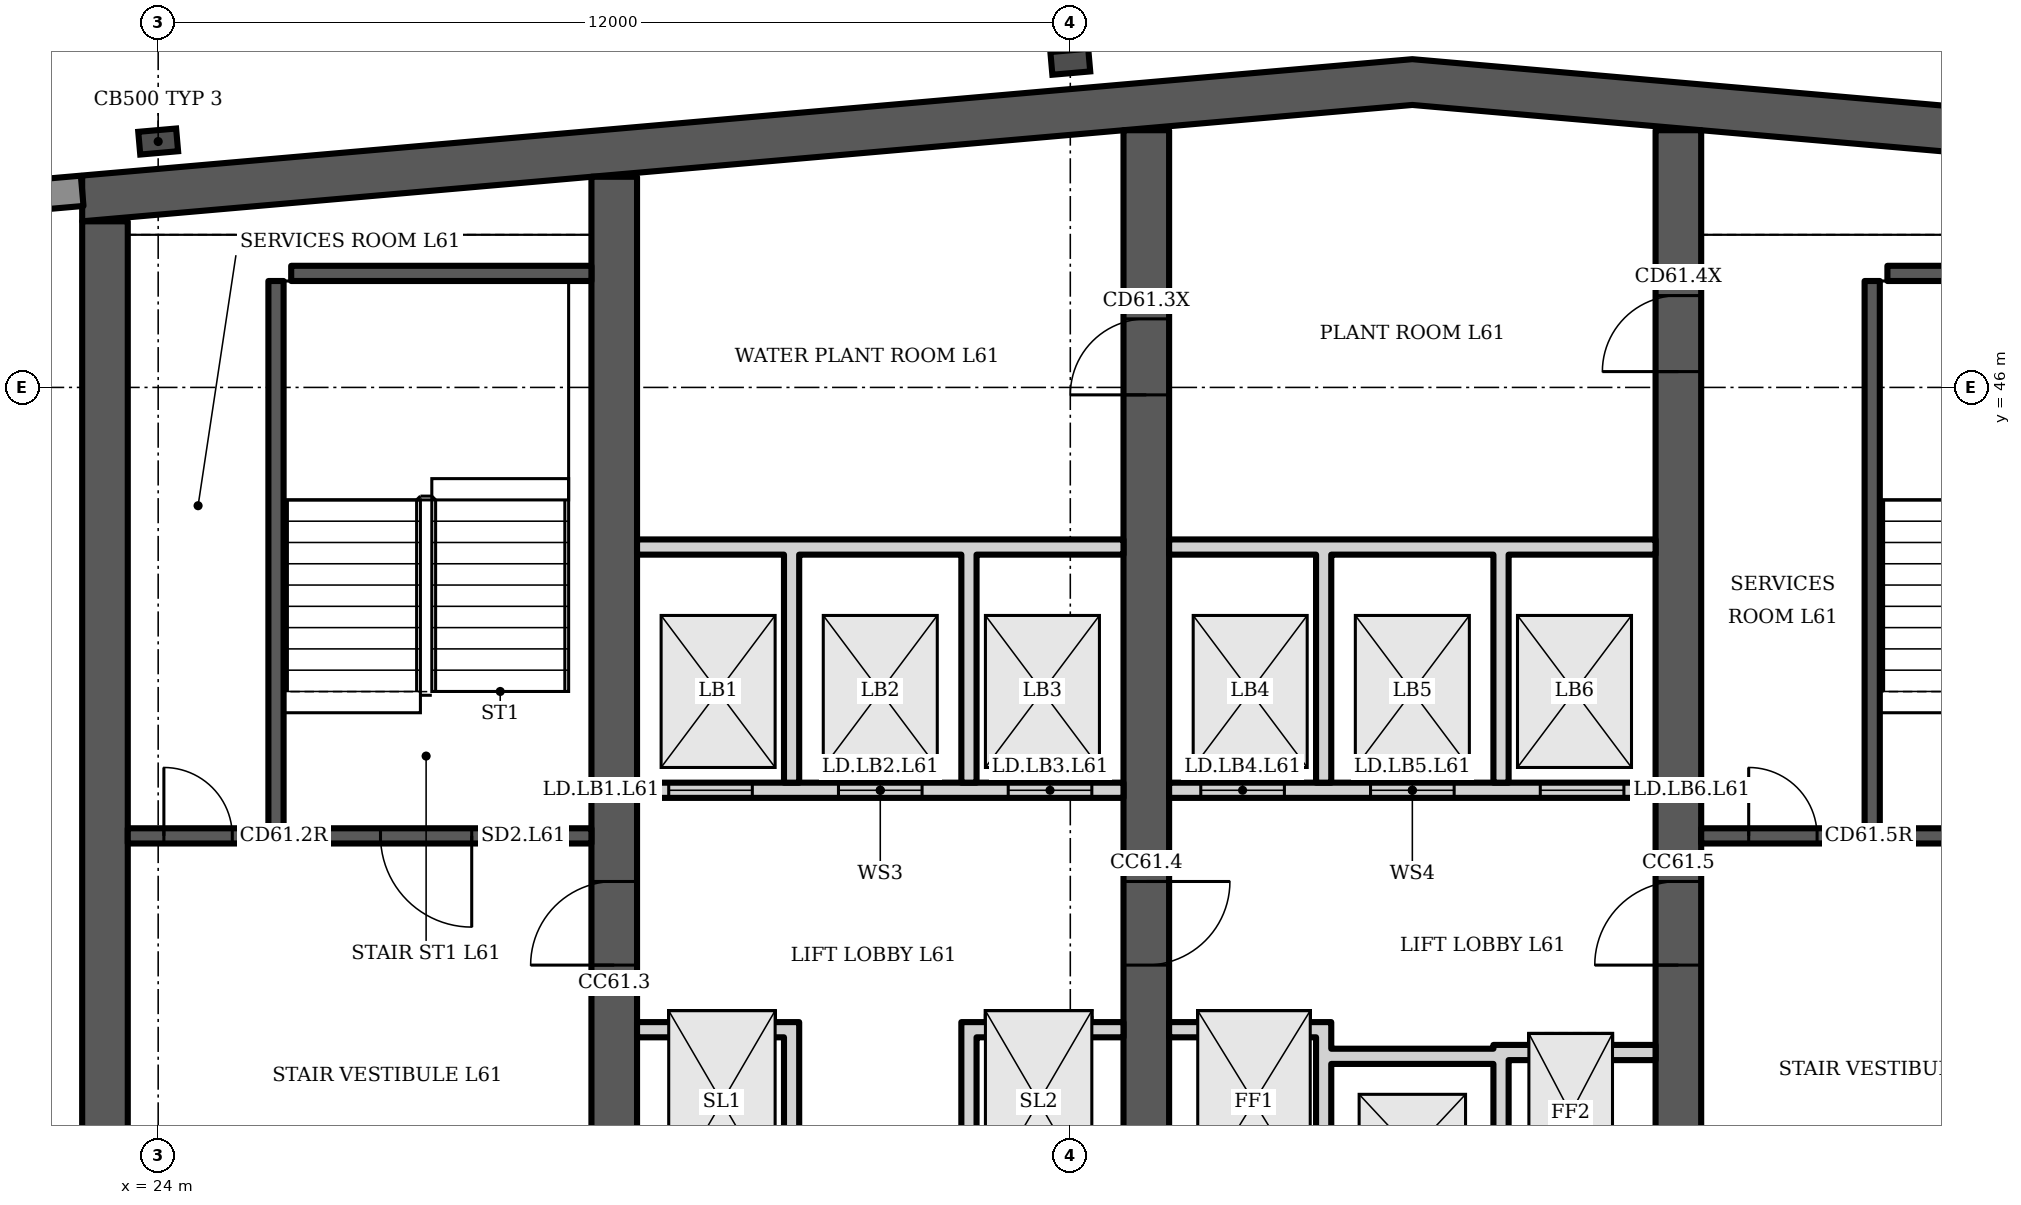
"""IFC4 building model, lengths in metres.
Left out: names, types, materials, properties, quantities, classifications, styles, units other than length and angle.
Written with IfcOpenShell. Run it as: python <this file> out.ifc"""

import sys

from ifc_helpers import new_model, si_unit, direction, frame, frame_2d, origin, origin_2d, place, context, subcontext, project, spatial, polyline, rectangle, i_section, outline, extrude, element, fill, save


model = new_model("IFC4")
c1 = context("Model", 3, precision=1e-05, world=origin(), true_north=direction((0.0, 1.0)))
c2 = subcontext(c1, "Body", "Model", "MODEL_VIEW")
j1 = project(units=[si_unit("LENGTHUNIT", "METRE"), si_unit("PLANEANGLEUNIT", "RADIAN")], contexts=[c1])
p1 = place(None, origin())
s1 = spatial("IfcSite", under=j1, at=p1, CompositionType="ELEMENT")
p2 = place(p1, origin())
s2 = spatial("IfcBuilding", under=s1, at=p2, CompositionType="ELEMENT")
p3 = place(p2, frame((0.0, 0.0, 243.1)))
s3 = spatial("IfcBuildingStorey", under=s2, at=p3, CompositionType="ELEMENT", Elevation=243.1)
p4 = place(p3, frame((0.0, 0.0, -0.0)))
e1 = element("IfcWall", 1, at=p4, inside=s3, PredefinedType="SHEAR", context=c2, shape_type="SweptSolid", body=[
    extrude(outline(polyline([(23.0, 48.185), (40.5, 49.716), (58.0, 48.185), (58.0, 48.787), (40.5, 50.318), (23.0, 48.787), (23.0, 48.185)])), origin(), (0.0, 0.0, 1.0), 3.6),
])
p5 = place(p3, frame((23.3, 34.6, 0.0), z_axis=(0.0, 0.0, 1.0), x_axis=(0.0, 1.0, 0.0)))
e2 = element("IfcWall", 2, at=p5, inside=s3, PredefinedType="SHEAR", context=c2, shape_type="SweptSolid", body=[
    extrude(rectangle(XDim=13.585, YDim=0.6, at=frame_2d((6.792, 0.0))), origin(), (0.0, 0.0, 1.0), 3.6),
])
p6 = place(p3, frame((30.0, 34.6, 0.0), z_axis=(0.0, 0.0, 1.0), x_axis=(0.0, 1.0, 0.0)))
e3 = element("IfcWall", 3, at=p6, inside=s3, PredefinedType="SHEAR", context=c2, shape_type="SweptSolid", body=[
    extrude(rectangle(XDim=14.171, YDim=0.6, at=frame_2d((7.085, 0.0))), origin(), (0.0, 0.0, 1.0), 3.6),
])
p7 = place(p6, frame((3.8, 0.0, 0.0)))
e4 = element("IfcOpeningElement", 4, at=p7, cuts=e3, PredefinedType="OPENING", context=c2, shape_type="SweptSolid", body=[
    extrude(rectangle(XDim=1.1, YDim=2.1, at=frame_2d((0.55, 1.05))), frame((0.0, 0.31, 0.0), z_axis=(0.0, -1.0, 0.0), x_axis=(1.0, 0.0, 0.0)), (0.0, 0.0, 1.0), 0.62),
])
p8 = place(p3, frame((37.0, 34.6, 0.0), z_axis=(0.0, 0.0, 1.0), x_axis=(0.0, 1.0, 0.0)))
e5 = element("IfcWall", 5, at=p8, inside=s3, PredefinedType="SHEAR", context=c2, shape_type="SweptSolid", body=[
    extrude(rectangle(XDim=14.784, YDim=0.6, at=frame_2d((7.392, 0.0))), origin(), (0.0, 0.0, 1.0), 3.6),
])
p9 = place(p8, frame((11.302, 0.0, 0.0)))
e6 = element("IfcOpeningElement", 6, at=p9, cuts=e5, PredefinedType="OPENING", context=c2, shape_type="SweptSolid", body=[
    extrude(rectangle(XDim=1.0, YDim=2.1, at=frame_2d((0.5, 1.05))), frame((0.0, 0.31, 0.0), z_axis=(0.0, -1.0, 0.0), x_axis=(1.0, 0.0, 0.0)), (0.0, 0.0, 1.0), 0.62),
])
p10 = place(p8, frame((3.8, 0.0, 0.0)))
e7 = element("IfcOpeningElement", 7, at=p10, cuts=e5, PredefinedType="OPENING", context=c2, shape_type="SweptSolid", body=[
    extrude(rectangle(XDim=1.1, YDim=2.1, at=frame_2d((0.55, 1.05))), frame((0.0, 0.31, 0.0), z_axis=(0.0, -1.0, 0.0), x_axis=(1.0, 0.0, 0.0)), (0.0, 0.0, 1.0), 0.62),
])
p11 = place(p3, frame((44.0, 34.6, 0.0), z_axis=(0.0, 0.0, 1.0), x_axis=(0.0, 1.0, 0.0)))
e8 = element("IfcWall", 8, at=p11, inside=s3, PredefinedType="SHEAR", context=c2, shape_type="SweptSolid", body=[
    extrude(rectangle(XDim=14.784, YDim=0.6, at=frame_2d((7.392, 0.0))), origin(), (0.0, 0.0, 1.0), 3.6),
])
p12 = place(p11, frame((11.608, 0.0, 0.0)))
e9 = element("IfcOpeningElement", 9, at=p12, cuts=e8, PredefinedType="OPENING", context=c2, shape_type="SweptSolid", body=[
    extrude(rectangle(XDim=1.0, YDim=2.1, at=frame_2d((0.5, 1.05))), frame((0.0, 0.31, 0.0), z_axis=(0.0, -1.0, 0.0), x_axis=(1.0, 0.0, 0.0)), (0.0, 0.0, 1.0), 0.62),
])
p13 = place(p11, frame((3.8, 0.0, 0.0)))
e10 = element("IfcOpeningElement", 10, at=p13, cuts=e8, PredefinedType="OPENING", context=c2, shape_type="SweptSolid", body=[
    extrude(rectangle(XDim=1.1, YDim=2.1, at=frame_2d((0.55, 1.05))), frame((0.0, 0.31, 0.0), z_axis=(0.0, -1.0, 0.0), x_axis=(1.0, 0.0, 0.0)), (0.0, 0.0, 1.0), 0.62),
])
for number, where, z_axis, x_axis in (
    (11, (24.0, 49.235, 0.0), (0.0, 0.0, 1.0), (-0.087, 0.996, 0.0)),
    (12, (36.0, 50.285, 0.0), (0.0, 0.0, 1.0), (-0.087, 0.996, 0.0)),
):
    element("IfcColumn", number, at=place(p3, frame(where, z_axis=z_axis, x_axis=x_axis)), inside=s3, PredefinedType="COLUMN", context=c2, shape_type="SweptSolid", body=[
        extrude(i_section(OverallWidth=0.3, OverallDepth=0.5, WebThickness=0.014, FlangeThickness=0.028, FilletRadius=0.027, at=origin_2d()), origin(), (0.0, 0.0, 1.0), 3.6),
    ])
p14 = place(p3, frame((23.0, 48.587, 0.0), z_axis=(0.0, 0.0, 1.0), x_axis=(-0.996194, -0.087168, 0.0)))
e13 = element("IfcWall", 13, at=p14, inside=s3, PredefinedType="SOLIDWALL", context=c2, shape_type="SweptSolid", body=[
    extrude(rectangle(XDim=2.994, YDim=0.4, at=frame_2d((1.497, 0.0))), origin(), (0.0, 0.0, 1.0), 3.2),
])
p15 = place(p3, frame((23.6, 40.1, 0.0), z_axis=(0.0, 0.0, 1.0), x_axis=(1.0, 0.0, 0.0)))
e14 = element("IfcWall", 14, at=p15, inside=s3, PredefinedType="SHEAR", context=c2, shape_type="SweptSolid", body=[
    extrude(rectangle(XDim=6.1, YDim=0.2, at=frame_2d((3.05, 0.0))), origin(), (0.0, 0.0, 1.0), 3.2),
])
p16 = place(p15, frame((3.325, 0.0, 0.0)))
e15 = element("IfcOpeningElement", 15, at=p16, cuts=e14, PredefinedType="OPENING", context=c2, shape_type="SweptSolid", body=[
    extrude(rectangle(XDim=1.2, YDim=2.1, at=frame_2d((0.6, 1.05))), frame((0.0, 0.11, 0.0), z_axis=(0.0, -1.0, 0.0), x_axis=(1.0, 0.0, 0.0)), (0.0, 0.0, 1.0), 0.22),
])
p17 = place(p15, frame((0.475, 0.0, 0.0)))
e16 = element("IfcOpeningElement", 16, at=p17, cuts=e14, PredefinedType="OPENING", context=c2, shape_type="SweptSolid", body=[
    extrude(rectangle(XDim=0.9, YDim=2.1, at=frame_2d((0.45, 1.05))), frame((0.0, 0.11, 0.0), z_axis=(0.0, -1.0, 0.0), x_axis=(1.0, 0.0, 0.0)), (0.0, 0.0, 1.0), 0.22),
])
p18 = place(p3, frame((25.55, 40.2, 0.0), z_axis=(0.0, 0.0, 1.0), x_axis=(0.0, 1.0, 0.0)))
e17 = element("IfcWall", 17, at=p18, inside=s3, PredefinedType="SHEAR", context=c2, shape_type="SweptSolid", body=[
    extrude(rectangle(XDim=7.2, YDim=0.2, at=frame_2d((3.6, 0.0))), origin(), (0.0, 0.0, 1.0), 3.2),
])
p19 = place(p3, frame((25.75, 47.5, 0.0), z_axis=(0.0, 0.0, 1.0), x_axis=(1.0, 0.0, 0.0)))
e18 = element("IfcWall", 18, at=p19, inside=s3, PredefinedType="SHEAR", context=c2, shape_type="SweptSolid", body=[
    extrude(rectangle(XDim=3.95, YDim=0.2, at=frame_2d((1.975, 0.0))), origin(), (0.0, 0.0, 1.0), 3.2),
])
p20 = place(p3, frame((30.3, 40.7, 0.0), z_axis=(0.0, 0.0, 1.0), x_axis=(1.0, 0.0, 0.0)))
e19 = element("IfcWall", 19, at=p20, inside=s3, PredefinedType="PARTITIONING", context=c2, shape_type="SweptSolid", body=[
    extrude(rectangle(XDim=6.4, YDim=0.2, at=frame_2d((3.2, 0.0))), origin(), (0.0, 0.0, 1.0), 3.2),
])
p21 = place(p20, frame((0.417, 0.0, 0.0)))
e20 = element("IfcOpeningElement", 20, at=p21, cuts=e19, PredefinedType="OPENING", context=c2, shape_type="SweptSolid", body=[
    extrude(rectangle(XDim=1.1, YDim=2.1, at=frame_2d((0.55, 1.05))), frame((0.0, 0.11, 0.0), z_axis=(0.0, -1.0, 0.0), x_axis=(1.0, 0.0, 0.0)), (0.0, 0.0, 1.0), 0.22),
])
p22 = place(p20, frame((2.65, 0.0, 0.0)))
e21 = element("IfcOpeningElement", 21, at=p22, cuts=e19, PredefinedType="OPENING", context=c2, shape_type="SweptSolid", body=[
    extrude(rectangle(XDim=1.1, YDim=2.1, at=frame_2d((0.55, 1.05))), frame((0.0, 0.11, 0.0), z_axis=(0.0, -1.0, 0.0), x_axis=(1.0, 0.0, 0.0)), (0.0, 0.0, 1.0), 0.22),
])
p23 = place(p20, frame((4.883, 0.0, 0.0)))
e22 = element("IfcOpeningElement", 22, at=p23, cuts=e19, PredefinedType="OPENING", context=c2, shape_type="SweptSolid", body=[
    extrude(rectangle(XDim=1.1, YDim=2.1, at=frame_2d((0.55, 1.05))), frame((0.0, 0.11, 0.0), z_axis=(0.0, -1.0, 0.0), x_axis=(1.0, 0.0, 0.0)), (0.0, 0.0, 1.0), 0.22),
])
p24 = place(p3, frame((0.0, 0.0, -0.0)))
e23 = element("IfcWall", 23, at=p24, inside=s3, PredefinedType="PARTITIONING", context=c2, shape_type="SweptSolid", body=[
    extrude(outline(polyline([(32.233, 37.45), (30.3, 37.45), (30.3, 37.65), (32.233, 37.65), (32.433, 37.65), (32.433, 34.6), (32.233, 34.6), (32.233, 37.45)])), origin(), (0.0, 0.0, 1.0), 3.2),
])
p25 = place(p3, frame((0.0, 0.0, -0.0)))
e24 = element("IfcWall", 24, at=p25, inside=s3, PredefinedType="PARTITIONING", context=c2, shape_type="SweptSolid", body=[
    extrude(outline(polyline([(34.567, 37.65), (34.767, 37.65), (36.7, 37.65), (36.7, 37.45), (34.767, 37.45), (34.767, 34.6), (34.567, 34.6), (34.567, 37.65)])), origin(), (0.0, 0.0, 1.0), 3.2),
])
p26 = place(p3, frame((0.0, 0.0, -0.0)))
e25 = element("IfcWall", 25, at=p26, inside=s3, PredefinedType="PARTITIONING", context=c2, shape_type="SweptSolid", body=[
    extrude(outline(polyline([(32.433, 40.8), (32.233, 40.8), (32.233, 43.8), (30.3, 43.8), (30.3, 44.0), (36.7, 44.0), (36.7, 43.8), (34.767, 43.8), (34.767, 40.8), (34.567, 40.8), (34.567, 43.8), (32.433, 43.8), (32.433, 40.8)])), origin(), (0.0, 0.0, 1.0), 3.2),
])
p27 = place(p3, frame((37.3, 40.7, 0.0), z_axis=(0.0, 0.0, 1.0), x_axis=(1.0, 0.0, 0.0)))
e26 = element("IfcWall", 26, at=p27, inside=s3, PredefinedType="PARTITIONING", context=c2, shape_type="SweptSolid", body=[
    extrude(rectangle(XDim=6.4, YDim=0.2, at=frame_2d((3.2, 0.0))), origin(), (0.0, 0.0, 1.0), 3.2),
])
p28 = place(p27, frame((0.417, 0.0, 0.0)))
e27 = element("IfcOpeningElement", 27, at=p28, cuts=e26, PredefinedType="OPENING", context=c2, shape_type="SweptSolid", body=[
    extrude(rectangle(XDim=1.1, YDim=2.1, at=frame_2d((0.55, 1.05))), frame((0.0, 0.11, 0.0), z_axis=(0.0, -1.0, 0.0), x_axis=(1.0, 0.0, 0.0)), (0.0, 0.0, 1.0), 0.22),
])
p29 = place(p27, frame((2.65, 0.0, 0.0)))
e28 = element("IfcOpeningElement", 28, at=p29, cuts=e26, PredefinedType="OPENING", context=c2, shape_type="SweptSolid", body=[
    extrude(rectangle(XDim=1.1, YDim=2.1, at=frame_2d((0.55, 1.05))), frame((0.0, 0.11, 0.0), z_axis=(0.0, -1.0, 0.0), x_axis=(1.0, 0.0, 0.0)), (0.0, 0.0, 1.0), 0.22),
])
p30 = place(p27, frame((4.883, 0.0, 0.0)))
e29 = element("IfcOpeningElement", 29, at=p30, cuts=e26, PredefinedType="OPENING", context=c2, shape_type="SweptSolid", body=[
    extrude(rectangle(XDim=1.1, YDim=2.1, at=frame_2d((0.55, 1.05))), frame((0.0, 0.11, 0.0), z_axis=(0.0, -1.0, 0.0), x_axis=(1.0, 0.0, 0.0)), (0.0, 0.0, 1.0), 0.22),
])
p31 = place(p3, frame((0.0, 0.0, -0.0)))
e30 = element("IfcWall", 30, at=p31, inside=s3, PredefinedType="PARTITIONING", context=c2, shape_type="SweptSolid", body=[
    extrude(outline(polyline([(41.567, 37.1), (39.433, 37.1), (39.433, 34.6), (39.233, 34.6), (39.233, 37.45), (37.3, 37.45), (37.3, 37.65), (39.233, 37.65), (39.433, 37.65), (39.433, 37.3), (41.567, 37.3), (41.567, 37.35), (41.767, 37.35), (43.7, 37.35), (43.7, 37.15), (41.767, 37.15), (41.767, 34.6), (41.567, 34.6), (41.567, 37.1)])), origin(), (0.0, 0.0, 1.0), 3.2),
])
p32 = place(p3, frame((0.0, 0.0, -0.0)))
e31 = element("IfcWall", 31, at=p32, inside=s3, PredefinedType="PARTITIONING", context=c2, shape_type="SweptSolid", body=[
    extrude(outline(polyline([(39.433, 40.8), (39.233, 40.8), (39.233, 43.8), (37.3, 43.8), (37.3, 44.0), (43.7, 44.0), (43.7, 43.8), (41.767, 43.8), (41.767, 40.8), (41.567, 40.8), (41.567, 43.8), (39.433, 43.8), (39.433, 40.8)])), origin(), (0.0, 0.0, 1.0), 3.2),
])
p33 = place(p3, frame((44.3, 40.1, 0.0), z_axis=(0.0, 0.0, 1.0), x_axis=(1.0, 0.0, 0.0)))
e32 = element("IfcWall", 32, at=p33, inside=s3, PredefinedType="SHEAR", context=c2, shape_type="SweptSolid", body=[
    extrude(rectangle(XDim=6.4, YDim=0.2, at=frame_2d((3.2, 0.0))), origin(), (0.0, 0.0, 1.0), 3.2),
])
p34 = place(p33, frame((3.625, 0.0, 0.0)))
e33 = element("IfcOpeningElement", 33, at=p34, cuts=e32, PredefinedType="OPENING", context=c2, shape_type="SweptSolid", body=[
    extrude(rectangle(XDim=1.2, YDim=2.1, at=frame_2d((0.6, 1.05))), frame((0.0, 0.11, 0.0), z_axis=(0.0, -1.0, 0.0), x_axis=(1.0, 0.0, 0.0)), (0.0, 0.0, 1.0), 0.22),
])
p35 = place(p33, frame((0.625, 0.0, 0.0)))
e34 = element("IfcOpeningElement", 34, at=p35, cuts=e32, PredefinedType="OPENING", context=c2, shape_type="SweptSolid", body=[
    extrude(rectangle(XDim=0.9, YDim=2.1, at=frame_2d((0.45, 1.05))), frame((0.0, 0.11, 0.0), z_axis=(0.0, -1.0, 0.0), x_axis=(1.0, 0.0, 0.0)), (0.0, 0.0, 1.0), 0.22),
])
p36 = place(p3, frame((46.55, 40.2, 0.0), z_axis=(0.0, 0.0, 1.0), x_axis=(0.0, 1.0, 0.0)))
e35 = element("IfcWall", 35, at=p36, inside=s3, PredefinedType="SHEAR", context=c2, shape_type="SweptSolid", body=[
    extrude(rectangle(XDim=7.2, YDim=0.2, at=frame_2d((3.6, 0.0))), origin(), (0.0, 0.0, 1.0), 3.2),
])
p37 = place(p3, frame((46.75, 47.5, 0.0), z_axis=(0.0, 0.0, 1.0), x_axis=(1.0, 0.0, 0.0)))
e36 = element("IfcWall", 36, at=p37, inside=s3, PredefinedType="SHEAR", context=c2, shape_type="SweptSolid", body=[
    extrude(rectangle(XDim=3.95, YDim=0.2, at=frame_2d((1.975, 0.0))), origin(), (0.0, 0.0, 1.0), 3.2),
])
p38 = place(p16, origin())
e37 = element("IfcDoor", 37, at=p38, inside=s3, OperationType="SINGLE_SWING_RIGHT", PredefinedType="DOOR", context=c2, shape_type="SweptSolid", body=[
    extrude(rectangle(XDim=1.2, YDim=2.1, at=frame_2d((0.6, 1.05))), frame((0.0, 0.025, 0.0), z_axis=(0.0, -1.0, 0.0), x_axis=(1.0, 0.0, 0.0)), (0.0, 0.0, 1.0), 0.05),
])
fill(e15, e37)
p39 = place(p17, origin())
e38 = element("IfcDoor", 38, at=p39, inside=s3, OperationType="SINGLE_SWING_LEFT", PredefinedType="DOOR", context=c2, shape_type="SweptSolid", body=[
    extrude(rectangle(XDim=0.9, YDim=2.1, at=frame_2d((0.45, 1.05))), frame((0.0, 0.025, 0.0), z_axis=(0.0, -1.0, 0.0), x_axis=(1.0, 0.0, 0.0)), (0.0, 0.0, 1.0), 0.05),
])
fill(e16, e38)
p40 = place(p21, origin())
e39 = element("IfcDoor", 39, at=p40, inside=s3, OperationType="DOUBLE_DOOR_SLIDING", PredefinedType="DOOR", context=c2, shape_type="SweptSolid", body=[
    extrude(rectangle(XDim=1.1, YDim=2.1, at=frame_2d((0.55, 1.05))), frame((0.0, 0.025, 0.0), z_axis=(0.0, -1.0, 0.0), x_axis=(1.0, 0.0, 0.0)), (0.0, 0.0, 1.0), 0.05),
])
fill(e20, e39)
p41 = place(p22, origin())
e40 = element("IfcDoor", 40, at=p41, inside=s3, OperationType="DOUBLE_DOOR_SLIDING", PredefinedType="DOOR", context=c2, shape_type="SweptSolid", body=[
    extrude(rectangle(XDim=1.1, YDim=2.1, at=frame_2d((0.55, 1.05))), frame((0.0, 0.025, 0.0), z_axis=(0.0, -1.0, 0.0), x_axis=(1.0, 0.0, 0.0)), (0.0, 0.0, 1.0), 0.05),
])
fill(e21, e40)
p42 = place(p23, origin())
e41 = element("IfcDoor", 41, at=p42, inside=s3, OperationType="DOUBLE_DOOR_SLIDING", PredefinedType="DOOR", context=c2, shape_type="SweptSolid", body=[
    extrude(rectangle(XDim=1.1, YDim=2.1, at=frame_2d((0.55, 1.05))), frame((0.0, 0.025, 0.0), z_axis=(0.0, -1.0, 0.0), x_axis=(1.0, 0.0, 0.0)), (0.0, 0.0, 1.0), 0.05),
])
fill(e22, e41)
p43 = place(p9, origin())
e42 = element("IfcDoor", 42, at=p43, inside=s3, OperationType="SINGLE_SWING_LEFT", PredefinedType="DOOR", context=c2, shape_type="SweptSolid", body=[
    extrude(rectangle(XDim=1.0, YDim=2.1, at=frame_2d((0.5, 1.05))), frame((0.0, 0.025, 0.0), z_axis=(0.0, -1.0, 0.0), x_axis=(1.0, 0.0, 0.0)), (0.0, 0.0, 1.0), 0.05),
])
fill(e6, e42)
p44 = place(p28, origin())
e43 = element("IfcDoor", 43, at=p44, inside=s3, OperationType="DOUBLE_DOOR_SLIDING", PredefinedType="DOOR", context=c2, shape_type="SweptSolid", body=[
    extrude(rectangle(XDim=1.1, YDim=2.1, at=frame_2d((0.55, 1.05))), frame((0.0, 0.025, 0.0), z_axis=(0.0, -1.0, 0.0), x_axis=(1.0, 0.0, 0.0)), (0.0, 0.0, 1.0), 0.05),
])
fill(e27, e43)
p45 = place(p29, origin())
e44 = element("IfcDoor", 44, at=p45, inside=s3, OperationType="DOUBLE_DOOR_SLIDING", PredefinedType="DOOR", context=c2, shape_type="SweptSolid", body=[
    extrude(rectangle(XDim=1.1, YDim=2.1, at=frame_2d((0.55, 1.05))), frame((0.0, 0.025, 0.0), z_axis=(0.0, -1.0, 0.0), x_axis=(1.0, 0.0, 0.0)), (0.0, 0.0, 1.0), 0.05),
])
fill(e28, e44)
p46 = place(p30, origin())
e45 = element("IfcDoor", 45, at=p46, inside=s3, OperationType="DOUBLE_DOOR_SLIDING", PredefinedType="DOOR", context=c2, shape_type="SweptSolid", body=[
    extrude(rectangle(XDim=1.1, YDim=2.1, at=frame_2d((0.55, 1.05))), frame((0.0, 0.025, 0.0), z_axis=(0.0, -1.0, 0.0), x_axis=(1.0, 0.0, 0.0)), (0.0, 0.0, 1.0), 0.05),
])
fill(e29, e45)
p47 = place(p12, origin())
e46 = element("IfcDoor", 46, at=p47, inside=s3, OperationType="SINGLE_SWING_LEFT", PredefinedType="DOOR", context=c2, shape_type="SweptSolid", body=[
    extrude(rectangle(XDim=1.0, YDim=2.1, at=frame_2d((0.5, 1.05))), frame((0.0, 0.025, 0.0), z_axis=(0.0, -1.0, 0.0), x_axis=(1.0, 0.0, 0.0)), (0.0, 0.0, 1.0), 0.05),
])
fill(e9, e46)
p48 = place(p35, origin())
e47 = element("IfcDoor", 47, at=p48, inside=s3, OperationType="SINGLE_SWING_LEFT", PredefinedType="DOOR", context=c2, shape_type="SweptSolid", body=[
    extrude(rectangle(XDim=0.9, YDim=2.1, at=frame_2d((0.45, 1.05))), frame((0.0, 0.025, 0.0), z_axis=(0.0, -1.0, 0.0), x_axis=(1.0, 0.0, 0.0)), (0.0, 0.0, 1.0), 0.05),
])
fill(e34, e47)
p49 = place(p7, origin())
e48 = element("IfcDoor", 48, at=p49, inside=s3, OperationType="SINGLE_SWING_LEFT", PredefinedType="DOOR", context=c2, shape_type="SweptSolid", body=[
    extrude(rectangle(XDim=1.1, YDim=2.1, at=frame_2d((0.55, 1.05))), frame((0.0, 0.025, 0.0), z_axis=(0.0, -1.0, 0.0), x_axis=(1.0, 0.0, 0.0)), (0.0, 0.0, 1.0), 0.05),
])
fill(e4, e48)
p50 = place(p10, origin())
e49 = element("IfcDoor", 49, at=p50, inside=s3, OperationType="SINGLE_SWING_RIGHT", PredefinedType="DOOR", context=c2, shape_type="SweptSolid", body=[
    extrude(rectangle(XDim=1.1, YDim=2.1, at=frame_2d((0.55, 1.05))), frame((0.0, 0.025, 0.0), z_axis=(0.0, -1.0, 0.0), x_axis=(1.0, 0.0, 0.0)), (0.0, 0.0, 1.0), 0.05),
])
fill(e7, e49)
p51 = place(p13, origin())
e50 = element("IfcDoor", 50, at=p51, inside=s3, OperationType="SINGLE_SWING_LEFT", PredefinedType="DOOR", context=c2, shape_type="SweptSolid", body=[
    extrude(rectangle(XDim=1.1, YDim=2.1, at=frame_2d((0.55, 1.05))), frame((0.0, 0.025, 0.0), z_axis=(0.0, -1.0, 0.0), x_axis=(1.0, 0.0, 0.0)), (0.0, 0.0, 1.0), 0.05),
])
fill(e10, e50)
save(model, sys.argv[1])
